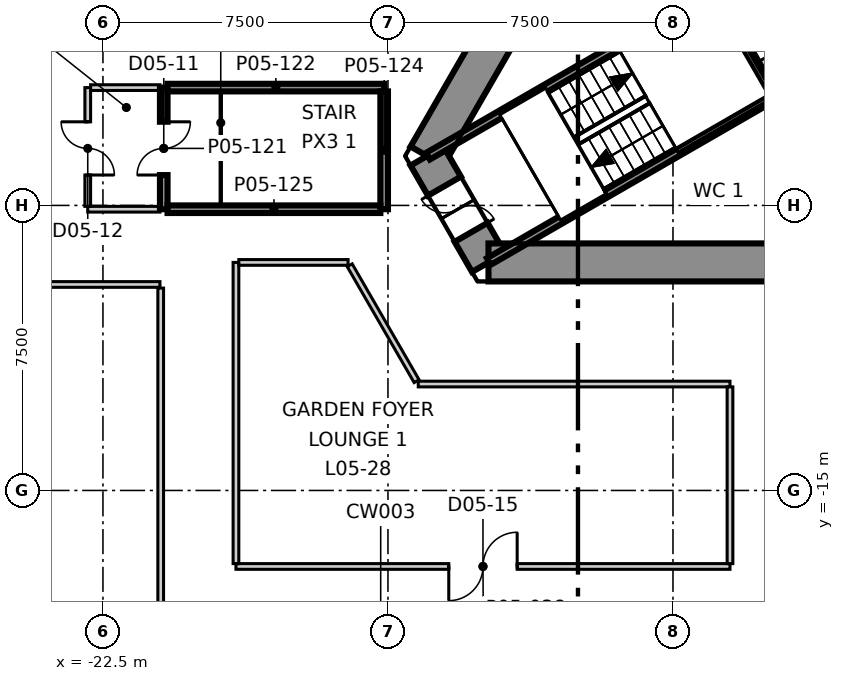
"""IFC4 building model, lengths in metres.
Left out: names, types, materials, properties, quantities, classifications, styles, units other than length and angle.
Written with IfcOpenShell. Run it as: python <this file> out.ifc"""

import sys

from ifc_helpers import new_model, si_unit, direction, frame, frame_2d, origin, place, context, subcontext, project, spatial, polyline, rectangle, outline, extrude, element, fill, save


model = new_model("IFC4")
c1 = context("Model", 3, precision=1e-05, world=origin(), true_north=direction((0.0, 1.0)))
c2 = subcontext(c1, "Body", "Model", "MODEL_VIEW")
j1 = project(units=[si_unit("LENGTHUNIT", "METRE"), si_unit("PLANEANGLEUNIT", "RADIAN")], contexts=[c1])
p1 = place(None, origin())
s1 = spatial("IfcSite", under=j1, at=p1, CompositionType="ELEMENT")
p2 = place(p1, origin())
s2 = spatial("IfcBuilding", under=s1, at=p2, CompositionType="ELEMENT")
p3 = place(p2, frame((0.0, 0.0, 30.3)))
s3 = spatial("IfcBuildingStorey", under=s2, at=p3, CompositionType="ELEMENT", Elevation=30.3)
p4 = place(p3, frame((-1.617, 15.2, -0.4), z_axis=(0.0, 0.0, 1.0), x_axis=(-0.499992141631, -0.866029940768, 0.0)))
e1 = element("IfcWall", 1, at=p4, inside=s3, PredefinedType="SHEAR", context=c2, shape_type="SweptSolid", body=[
    extrude(outline(polyline([(-0.289, -0.499), (1.656, -0.499), (3.601, -0.499), (5.547, -0.499), (7.492, -0.499), (9.437, -0.5), (11.382, -0.5), (13.328, -0.5), (15.273, -0.5), (17.218, -0.5), (19.163, -0.5), (21.109, -0.5), (23.054, -0.5), (24.999, -0.5), (24.422, 0.5), (22.566, 0.5), (20.709, 0.5), (18.853, 0.5), (16.997, 0.5), (15.14, 0.5), (13.284, 0.5), (11.427, 0.5), (9.571, 0.5), (7.715, 0.5), (5.858, 0.5), (4.002, 0.5), (2.146, 0.5), (0.289, 0.5), (-0.289, -0.499)])), origin(), (0.0, 0.0, 1.0), 5.1),
])
p5 = place(p4, frame((11.805, 0.0, 0.4)))
e2 = element("IfcOpeningElement", 2, at=p5, cuts=e1, PredefinedType="OPENING", context=c2, shape_type="SweptSolid", body=[
    extrude(rectangle(XDim=1.1, YDim=2.1, at=frame_2d((0.55, 1.05))), frame((0.0, 0.51, 0.0), z_axis=(0.0, -1.0, 0.0), x_axis=(1.0, 0.0, 0.0)), (0.0, 0.0, 1.0), 1.02),
])
p6 = place(p3, frame((-13.972, -6.2, -0.4), z_axis=(0.0, 0.0, 1.0), x_axis=(0.500077567175, -0.865980615723, 0.0)))
e3 = element("IfcWall", 3, at=p6, inside=s3, PredefinedType="SHEAR", context=c2, shape_type="SweptSolid", body=[
    extrude(outline(polyline([(-0.289, -0.5), (1.616, -0.5), (3.522, -0.5), (2.944, 0.499), (1.617, 0.5), (0.289, 0.5), (-0.289, -0.5)])), origin(), (0.0, 0.0, 1.0), 5.1),
])
p7 = place(p6, frame((0.917, 0.0, 0.4)))
e4 = element("IfcOpeningElement", 4, at=p7, cuts=e3, PredefinedType="OPENING", context=c2, shape_type="SweptSolid", body=[
    extrude(rectangle(XDim=1.4, YDim=2.1, at=frame_2d((0.7, 1.05))), frame((0.0, 0.51, 0.0), z_axis=(0.0, -1.0, 0.0), x_axis=(1.0, 0.0, 0.0)), (0.0, 0.0, 1.0), 1.02),
])
p8 = place(p3, frame((-12.355, -9.0, -0.4), z_axis=(0.0, 0.0, 1.0), x_axis=(1.0, 0.0, 0.0)))
e5 = element("IfcWall", 5, at=p8, inside=s3, PredefinedType="SHEAR", context=c2, shape_type="SweptSolid", body=[
    extrude(outline(polyline([(-0.289, -0.5), (1.656, -0.5), (3.601, -0.5), (5.547, -0.5), (7.492, -0.5), (9.437, -0.5), (11.382, -0.5), (13.328, -0.5), (15.273, -0.5), (17.218, -0.5), (19.163, -0.5), (21.109, -0.5), (23.054, -0.5), (24.999, -0.5), (24.422, 0.5), (22.566, 0.5), (20.709, 0.5), (18.853, 0.5), (16.996, 0.5), (15.14, 0.5), (13.283, 0.5), (11.427, 0.5), (9.57, 0.5), (7.714, 0.5), (5.857, 0.5), (4.001, 0.5), (2.145, 0.5), (0.288, 0.5), (-0.289, -0.5)])), origin(), (0.0, 0.0, 1.0), 5.1),
])
p9 = place(p3, frame((-22.9, -7.6, 0.0), z_axis=(0.0, 0.0, 1.0), x_axis=(1.0, 0.0, 0.0)))
e6 = element("IfcWall", 6, at=p9, inside=s3, PredefinedType="PARTITIONING", context=c2, shape_type="SweptSolid", body=[
    extrude(rectangle(XDim=1.9, YDim=0.15, at=frame_2d((0.95, 0.0))), origin(), (0.0, 0.0, 1.0), 4.7),
])
p10 = place(p3, frame((-22.9, -7.525, 0.0), z_axis=(0.0, 0.0, 1.0), x_axis=(0.0, 1.0, 0.0)))
e7 = element("IfcWall", 7, at=p10, inside=s3, PredefinedType="PARTITIONING", context=c2, shape_type="SweptSolid", body=[
    extrude(rectangle(XDim=3.125, YDim=0.15, at=frame_2d((1.562, 0.0))), origin(), (0.0, 0.0, 1.0), 4.7),
])
p11 = place(p10, frame((0.825, 0.0, 0.0)))
e8 = element("IfcOpeningElement", 8, at=p11, cuts=e7, PredefinedType="OPENING", context=c2, shape_type="SweptSolid", body=[
    extrude(rectangle(XDim=1.4, YDim=2.1, at=frame_2d((0.7, 1.05))), frame((0.0, 0.085, 0.0), z_axis=(0.0, -1.0, 0.0), x_axis=(1.0, 0.0, 0.0)), (0.0, 0.0, 1.0), 0.17),
])
p12 = place(p3, frame((-22.825, -4.4, 0.0), z_axis=(0.0, 0.0, 1.0), x_axis=(1.0, 0.0, 0.0)))
e9 = element("IfcWall", 9, at=p12, inside=s3, PredefinedType="PARTITIONING", context=c2, shape_type="SweptSolid", body=[
    extrude(rectangle(XDim=1.825, YDim=0.15, at=frame_2d((0.913, 0.0))), origin(), (0.0, 0.0, 1.0), 4.7),
])
p13 = place(p3, frame((-24.805, -9.58, 0.0), z_axis=(0.0, 0.0, 1.0), x_axis=(1.0, 0.0, 0.0)))
e10 = element("IfcWall", 10, at=p13, inside=s3, PredefinedType="PARTITIONING", context=c2, shape_type="SweptSolid", body=[
    extrude(rectangle(XDim=3.805, YDim=0.15, at=frame_2d((1.902, 0.0))), origin(), (0.0, 0.0, 1.0), 4.7),
])
p14 = place(p3, frame((-20.98, -19.0, 0.0), z_axis=(0.0, 0.0, 1.0), x_axis=(0.0, 1.0, 0.0)))
e11 = element("IfcWall", 11, at=p14, inside=s3, PredefinedType="PARTITIONING", context=c2, shape_type="SweptSolid", body=[
    extrude(rectangle(XDim=9.325, YDim=0.15, at=frame_2d((4.663, 0.0))), origin(), (0.0, 0.0, 1.0), 4.7),
])
p15 = place(p3, frame((-19.0, -17.0, 0.0), z_axis=(0.0, 0.0, 1.0), x_axis=(1.0, 0.0, 0.0)))
e12 = element("IfcWall", 12, at=p15, inside=s3, PredefinedType="PARTITIONING", context=c2, shape_type="SweptSolid", body=[
    extrude(rectangle(XDim=13.0, YDim=0.15, at=frame_2d((6.5, 0.0))), origin(), (0.0, 0.0, 1.0), 4.7),
])
p16 = place(p15, frame((5.6, 0.0, 0.0)))
e13 = element("IfcOpeningElement", 13, at=p16, cuts=e12, PredefinedType="OPENING", context=c2, shape_type="SweptSolid", body=[
    extrude(rectangle(XDim=1.8, YDim=2.1, at=frame_2d((0.9, 1.05))), frame((0.0, 0.085, 0.0), z_axis=(0.0, -1.0, 0.0), x_axis=(1.0, 0.0, 0.0)), (0.0, 0.0, 1.0), 0.17),
])
p17 = place(p3, frame((-14.203, -12.2, 0.0), z_axis=(0.0, 0.0, 1.0), x_axis=(1.0, 0.0, 0.0)))
e14 = element("IfcWall", 14, at=p17, inside=s3, PredefinedType="PARTITIONING", context=c2, shape_type="SweptSolid", body=[
    extrude(rectangle(XDim=8.203, YDim=0.15, at=frame_2d((4.102, 0.0))), origin(), (0.0, 0.0, 1.0), 4.7),
])
p18 = place(p3, frame((-19.0, -16.925, 0.0), z_axis=(0.0, 0.0, 1.0), x_axis=(0.0, 1.0, 0.0)))
e15 = element("IfcWall", 15, at=p18, inside=s3, PredefinedType="PARTITIONING", context=c2, shape_type="SweptSolid", body=[
    extrude(rectangle(XDim=7.925, YDim=0.15, at=frame_2d((3.962, 0.0))), origin(), (0.0, 0.0, 1.0), 4.7),
])
p19 = place(p3, frame((-18.925, -9.0, 0.0), z_axis=(0.0, 0.0, 1.0), x_axis=(1.0, 0.0, 0.0)))
e16 = element("IfcWall", 16, at=p19, inside=s3, PredefinedType="PARTITIONING", context=c2, shape_type="SweptSolid", body=[
    extrude(rectangle(XDim=2.875, YDim=0.15, at=frame_2d((1.438, 0.0))), origin(), (0.0, 0.0, 1.0), 4.7),
])
p20 = place(p3, frame((-16.007, -9.075, 0.0), z_axis=(0.0, 0.0, 1.0), x_axis=(0.500008478926, -0.866020508419, 0.0)))
e17 = element("IfcWall", 17, at=p20, inside=s3, PredefinedType="PARTITIONING", context=c2, shape_type="SweptSolid", body=[
    extrude(rectangle(XDim=3.522, YDim=0.15, at=frame_2d((1.761, 0.0))), origin(), (0.0, 0.0, 1.0), 4.7),
])
p21 = place(p3, frame((-6.0, -16.925, 0.0), z_axis=(0.0, 0.0, 1.0), x_axis=(0.0, 1.0, 0.0)))
e18 = element("IfcWall", 18, at=p21, inside=s3, PredefinedType="PARTITIONING", context=c2, shape_type="SweptSolid", body=[
    extrude(rectangle(XDim=4.65, YDim=0.15, at=frame_2d((2.325, 0.0))), origin(), (0.0, 0.0, 1.0), 4.7),
])
p22 = place(p3, frame((-5.195, -3.801, 0.0), z_axis=(0.0, 0.0, 1.0), x_axis=(0.86665063443, 0.498915501706, 0.0)))
e19 = element("IfcWall", 19, at=p22, inside=s3, PredefinedType="SOLIDWALL", context=c2, shape_type="SweptSolid", body=[
    extrude(rectangle(XDim=0.341, YDim=0.2, at=frame_2d((0.17, 0.0))), origin(), (0.0, 0.0, 1.0), 4.7),
])
p23 = place(p3, frame((-13.946, -6.204, 0.0), z_axis=(0.0, 0.0, 1.0), x_axis=(0.866036527536, 0.499980732602, 0.0)))
e20 = element("IfcWall", 20, at=p23, inside=s3, PredefinedType="SOLIDWALL", context=c2, shape_type="SweptSolid", body=[
    extrude(rectangle(XDim=8.564, YDim=0.2, at=frame_2d((4.282, 0.0))), origin(), (0.0, 0.0, 1.0), 4.7),
])
p24 = place(p3, frame((-6.329, -2.038, 0.0), z_axis=(0.0, 0.0, 1.0), x_axis=(0.500200581029, -0.865909567298, 0.0)))
e21 = element("IfcWall", 21, at=p24, inside=s3, PredefinedType="SOLIDWALL", context=c2, shape_type="SweptSolid", body=[
    extrude(rectangle(XDim=2.799, YDim=0.2, at=frame_2d((1.399, 0.0))), origin(), (0.0, 0.0, 1.0), 4.7),
])
p25 = place(p3, frame((-12.346, -8.976, 0.0), z_axis=(0.0, 0.0, 1.0), x_axis=(0.865987152174, 0.50006624788, 0.0)))
e22 = element("IfcWall", 22, at=p25, inside=s3, PredefinedType="SOLIDWALL", context=c2, shape_type="SweptSolid", body=[
    extrude(rectangle(XDim=8.565, YDim=0.2, at=frame_2d((4.282, 0.0))), origin(), (0.0, 0.0, 1.0), 4.7),
])
p26 = place(p3, frame((-20.9, -7.6, 0.0), z_axis=(0.0, 0.0, 1.0), x_axis=(0.0, 1.0, 0.0)))
e23 = element("IfcWall", 23, at=p26, inside=s3, PredefinedType="SOLIDWALL", context=c2, shape_type="SweptSolid", body=[
    extrude(rectangle(XDim=3.2, YDim=0.2, at=frame_2d((1.6, 0.0))), origin(), (0.0, 0.0, 1.0), 4.7),
])
p27 = place(p26, frame((0.9, 0.0, 0.0)))
e24 = element("IfcOpeningElement", 24, at=p27, cuts=e23, PredefinedType="OPENING", context=c2, shape_type="SweptSolid", body=[
    extrude(rectangle(XDim=1.4, YDim=2.1, at=frame_2d((0.7, 1.05))), frame((0.0, 0.11, 0.0), z_axis=(0.0, -1.0, 0.0), x_axis=(1.0, 0.0, 0.0)), (0.0, 0.0, 1.0), 0.22),
])
p28 = place(p3, frame((-20.8, -4.4, 0.0), z_axis=(0.0, 0.0, 1.0), x_axis=(1.0, 0.0, 0.0)))
e25 = element("IfcWall", 25, at=p28, inside=s3, PredefinedType="SOLIDWALL", context=c2, shape_type="SweptSolid", body=[
    extrude(rectangle(XDim=5.7, YDim=0.2, at=frame_2d((2.85, 0.0))), origin(), (0.0, 0.0, 1.0), 4.7),
])
p29 = place(p3, frame((-15.1, -7.6, 0.0), z_axis=(0.0, 0.0, 1.0), x_axis=(0.0, 1.0, 0.0)))
e26 = element("IfcWall", 26, at=p29, inside=s3, PredefinedType="SOLIDWALL", context=c2, shape_type="SweptSolid", body=[
    extrude(rectangle(XDim=3.1, YDim=0.2, at=frame_2d((1.55, 0.0))), origin(), (0.0, 0.0, 1.0), 4.7),
])
p30 = place(p3, frame((-20.8, -7.6, 0.0), z_axis=(0.0, 0.0, 1.0), x_axis=(1.0, 0.0, 0.0)))
e27 = element("IfcWall", 27, at=p30, inside=s3, PredefinedType="SOLIDWALL", context=c2, shape_type="SweptSolid", body=[
    extrude(rectangle(XDim=5.6, YDim=0.2, at=frame_2d((2.8, 0.0))), origin(), (0.0, 0.0, 1.0), 4.7),
])
p31 = place(p27, origin())
e28 = element("IfcDoor", 28, at=p31, inside=s3, OperationType="DOUBLE_DOOR_SINGLE_SWING", PredefinedType="DOOR", context=c2, shape_type="SweptSolid", body=[
    extrude(rectangle(XDim=1.4, YDim=2.1, at=frame_2d((0.7, 1.05))), frame((0.0, 0.025, 0.0), z_axis=(0.0, -1.0, 0.0), x_axis=(1.0, 0.0, 0.0)), (0.0, 0.0, 1.0), 0.05),
])
fill(e24, e28)
p32 = place(p11, origin())
e29 = element("IfcDoor", 29, at=p32, inside=s3, OperationType="DOUBLE_DOOR_SINGLE_SWING", PredefinedType="DOOR", context=c2, shape_type="SweptSolid", body=[
    extrude(rectangle(XDim=1.4, YDim=2.1, at=frame_2d((0.7, 1.05))), frame((0.0, 0.025, 0.0), z_axis=(0.0, -1.0, 0.0), x_axis=(1.0, 0.0, 0.0)), (0.0, 0.0, 1.0), 0.05),
])
fill(e8, e29)
p33 = place(p16, origin())
e30 = element("IfcDoor", 30, at=p33, inside=s3, OperationType="DOUBLE_DOOR_SINGLE_SWING", PredefinedType="DOOR", context=c2, shape_type="SweptSolid", body=[
    extrude(rectangle(XDim=1.8, YDim=2.1, at=frame_2d((0.9, 1.05))), frame((0.0, 0.025, 0.0), z_axis=(0.0, -1.0, 0.0), x_axis=(1.0, 0.0, 0.0)), (0.0, 0.0, 1.0), 0.05),
])
fill(e13, e30)
p34 = place(p7, origin())
e31 = element("IfcDoor", 31, at=p34, inside=s3, OperationType="DOUBLE_DOOR_SINGLE_SWING", PredefinedType="DOOR", context=c2, shape_type="SweptSolid", body=[
    extrude(rectangle(XDim=1.4, YDim=2.1, at=frame_2d((0.7, 1.05))), frame((0.0, 0.025, 0.0), z_axis=(0.0, -1.0, 0.0), x_axis=(1.0, 0.0, 0.0)), (0.0, 0.0, 1.0), 0.05),
])
fill(e4, e31)
save(model, sys.argv[1])
